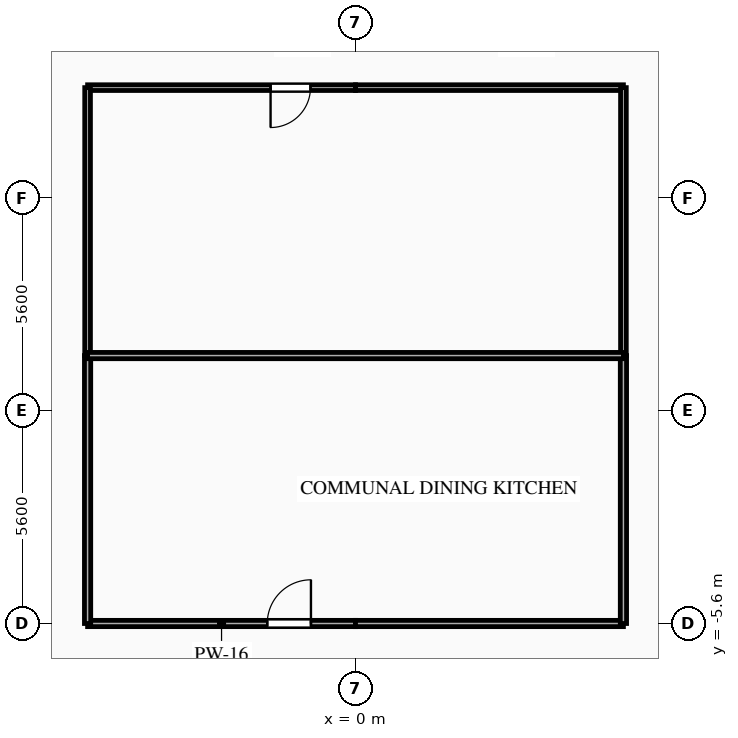
"""IFC4 building model, lengths in metres.
Left out: names, types, materials, properties, quantities, classifications, styles, units other than length and angle.
Written with IfcOpenShell. Run it as: python <this file> out.ifc"""

import sys

from ifc_helpers import new_model, si_unit, direction, frame, frame_2d, origin, place, context, subcontext, project, spatial, rectangle, extrude, element, fill, save


model = new_model("IFC4")
c1 = context("Model", 3, precision=1e-05, world=origin(), true_north=direction((0.0, 1.0)))
c2 = subcontext(c1, "Body", "Model", "MODEL_VIEW")
j1 = project(units=[si_unit("LENGTHUNIT", "METRE"), si_unit("PLANEANGLEUNIT", "RADIAN")], contexts=[c1])
p1 = place(None, origin())
s1 = spatial("IfcSite", under=j1, at=p1, CompositionType="ELEMENT")
p2 = place(p1, origin())
s2 = spatial("IfcBuilding", under=s1, at=p2, CompositionType="ELEMENT")
p3 = place(p2, frame((0.0, 0.0, 122.55)))
s3 = spatial("IfcBuildingStorey", under=s2, at=p3, CompositionType="ELEMENT", Elevation=122.55)
p4 = place(p3, frame((0.0, 8.5, 0.0), z_axis=(0.0, 0.0, 1.0), x_axis=(-1.0, 0.0, 0.0)))
e1 = element("IfcWall", 1, at=p4, inside=s3, PredefinedType="PARTITIONING", context=c2, shape_type="SweptSolid", body=[
    extrude(rectangle(XDim=7.05, YDim=0.15, at=frame_2d((3.525, 0.0))), origin(), (0.0, 0.0, 1.0), 3.0),
])
p5 = place(p4, frame((1.185, 0.0, 0.0)))
e2 = element("IfcOpeningElement", 2, at=p5, cuts=e1, PredefinedType="OPENING", context=c2, shape_type="SweptSolid", body=[
    extrude(rectangle(XDim=1.05, YDim=2.15, at=frame_2d((0.525, 1.075))), frame((0.0, 0.085, 0.0), z_axis=(0.0, -1.0, 0.0), x_axis=(1.0, 0.0, 0.0)), (0.0, 0.0, 1.0), 0.17),
])
p6 = place(p3, frame((7.05, 8.5, 0.0), z_axis=(0.0, 0.0, 1.0), x_axis=(-1.0, 0.0, 0.0)))
e3 = element("IfcWall", 3, at=p6, inside=s3, PredefinedType="PARTITIONING", context=c2, shape_type="SweptSolid", body=[
    extrude(rectangle(XDim=7.05, YDim=0.15, at=frame_2d((3.525, 0.0))), origin(), (0.0, 0.0, 1.0), 3.0),
])
p7 = place(p3, frame((-7.05, -5.6, 0.0), z_axis=(0.0, 0.0, 1.0), x_axis=(1.0, 0.0, 0.0)))
e4 = element("IfcWall", 4, at=p7, inside=s3, PredefinedType="PARTITIONING", context=c2, shape_type="SweptSolid", body=[
    extrude(rectangle(XDim=7.05, YDim=0.165, at=frame_2d((3.525, 0.0))), origin(), (0.0, 0.0, 1.0), 2.485),
])
p8 = place(p7, frame((4.728, 0.0, 0.0)))
e5 = element("IfcOpeningElement", 5, at=p8, cuts=e4, PredefinedType="OPENING", context=c2, shape_type="SweptSolid", body=[
    extrude(rectangle(XDim=1.15, YDim=2.15, at=frame_2d((0.575, 1.075))), frame((0.0, 0.093, 0.0), z_axis=(0.0, -1.0, 0.0), x_axis=(1.0, 0.0, 0.0)), (0.0, 0.0, 1.0), 0.185),
])
p9 = place(p3, frame((0.0, -5.6, 0.0), z_axis=(0.0, 0.0, 1.0), x_axis=(1.0, 0.0, 0.0)))
e6 = element("IfcWall", 6, at=p9, inside=s3, PredefinedType="PARTITIONING", context=c2, shape_type="SweptSolid", body=[
    extrude(rectangle(XDim=7.05, YDim=0.165, at=frame_2d((3.525, 0.0))), origin(), (0.0, 0.0, 1.0), 2.485),
])
p10 = place(p3, frame((-7.05, 1.45, 0.0), z_axis=(0.0, 0.0, 1.0), x_axis=(0.0, -1.0, 0.0)))
e7 = element("IfcWall", 7, at=p10, inside=s3, PredefinedType="PARTITIONING", context=c2, shape_type="SweptSolid", body=[
    extrude(rectangle(XDim=7.05, YDim=0.165, at=frame_2d((3.525, 0.0))), origin(), (0.0, 0.0, 1.0), 3.0),
])
p11 = place(p3, frame((-7.05, 8.5, 0.0), z_axis=(0.0, 0.0, 1.0), x_axis=(0.0, -1.0, 0.0)))
e8 = element("IfcWall", 8, at=p11, inside=s3, PredefinedType="PARTITIONING", context=c2, shape_type="SweptSolid", body=[
    extrude(rectangle(XDim=7.05, YDim=0.15, at=frame_2d((3.525, 0.0))), origin(), (0.0, 0.0, 1.0), 3.0),
])
p12 = place(p3, frame((7.05, -5.6, 0.0), z_axis=(0.0, 0.0, 1.0), x_axis=(0.0, 1.0, 0.0)))
e9 = element("IfcWall", 9, at=p12, inside=s3, PredefinedType="PARTITIONING", context=c2, shape_type="SweptSolid", body=[
    extrude(rectangle(XDim=7.05, YDim=0.165, at=frame_2d((3.525, 0.0))), origin(), (0.0, 0.0, 1.0), 3.0),
])
p13 = place(p3, frame((7.05, 1.45, 0.0), z_axis=(0.0, 0.0, 1.0), x_axis=(0.0, 1.0, 0.0)))
e10 = element("IfcWall", 10, at=p13, inside=s3, PredefinedType="PARTITIONING", context=c2, shape_type="SweptSolid", body=[
    extrude(rectangle(XDim=7.05, YDim=0.15, at=frame_2d((3.525, 0.0))), origin(), (0.0, 0.0, 1.0), 3.0),
])
p14 = place(p3, frame((-7.05, 1.45, 0.0), z_axis=(0.0, 0.0, 1.0), x_axis=(1.0, 0.0, 0.0)))
e11 = element("IfcWall", 11, at=p14, inside=s3, PredefinedType="PARTITIONING", context=c2, shape_type="SweptSolid", body=[
    extrude(rectangle(XDim=14.1, YDim=0.165, at=frame_2d((7.05, 0.0))), origin(), (0.0, 0.0, 1.0), 3.0),
])
p15 = place(p5, origin())
e12 = element("IfcDoor", 12, at=p15, inside=s3, OperationType="SINGLE_SWING_RIGHT", PredefinedType="DOOR", context=c2, shape_type="SweptSolid", body=[
    extrude(rectangle(XDim=1.05, YDim=2.15, at=frame_2d((0.525, 1.075))), frame((0.0, 0.025, 0.0), z_axis=(0.0, -1.0, 0.0), x_axis=(1.0, 0.0, 0.0)), (0.0, 0.0, 1.0), 0.05),
])
fill(e2, e12)
p16 = place(p8, origin())
e13 = element("IfcDoor", 13, at=p16, inside=s3, OperationType="SINGLE_SWING_RIGHT", PredefinedType="DOOR", context=c2, shape_type="SweptSolid", body=[
    extrude(rectangle(XDim=1.15, YDim=2.15, at=frame_2d((0.575, 1.075))), frame((0.0, 0.025, 0.0), z_axis=(0.0, -1.0, 0.0), x_axis=(1.0, 0.0, 0.0)), (0.0, 0.0, 1.0), 0.05),
])
fill(e5, e13)
save(model, sys.argv[1])
